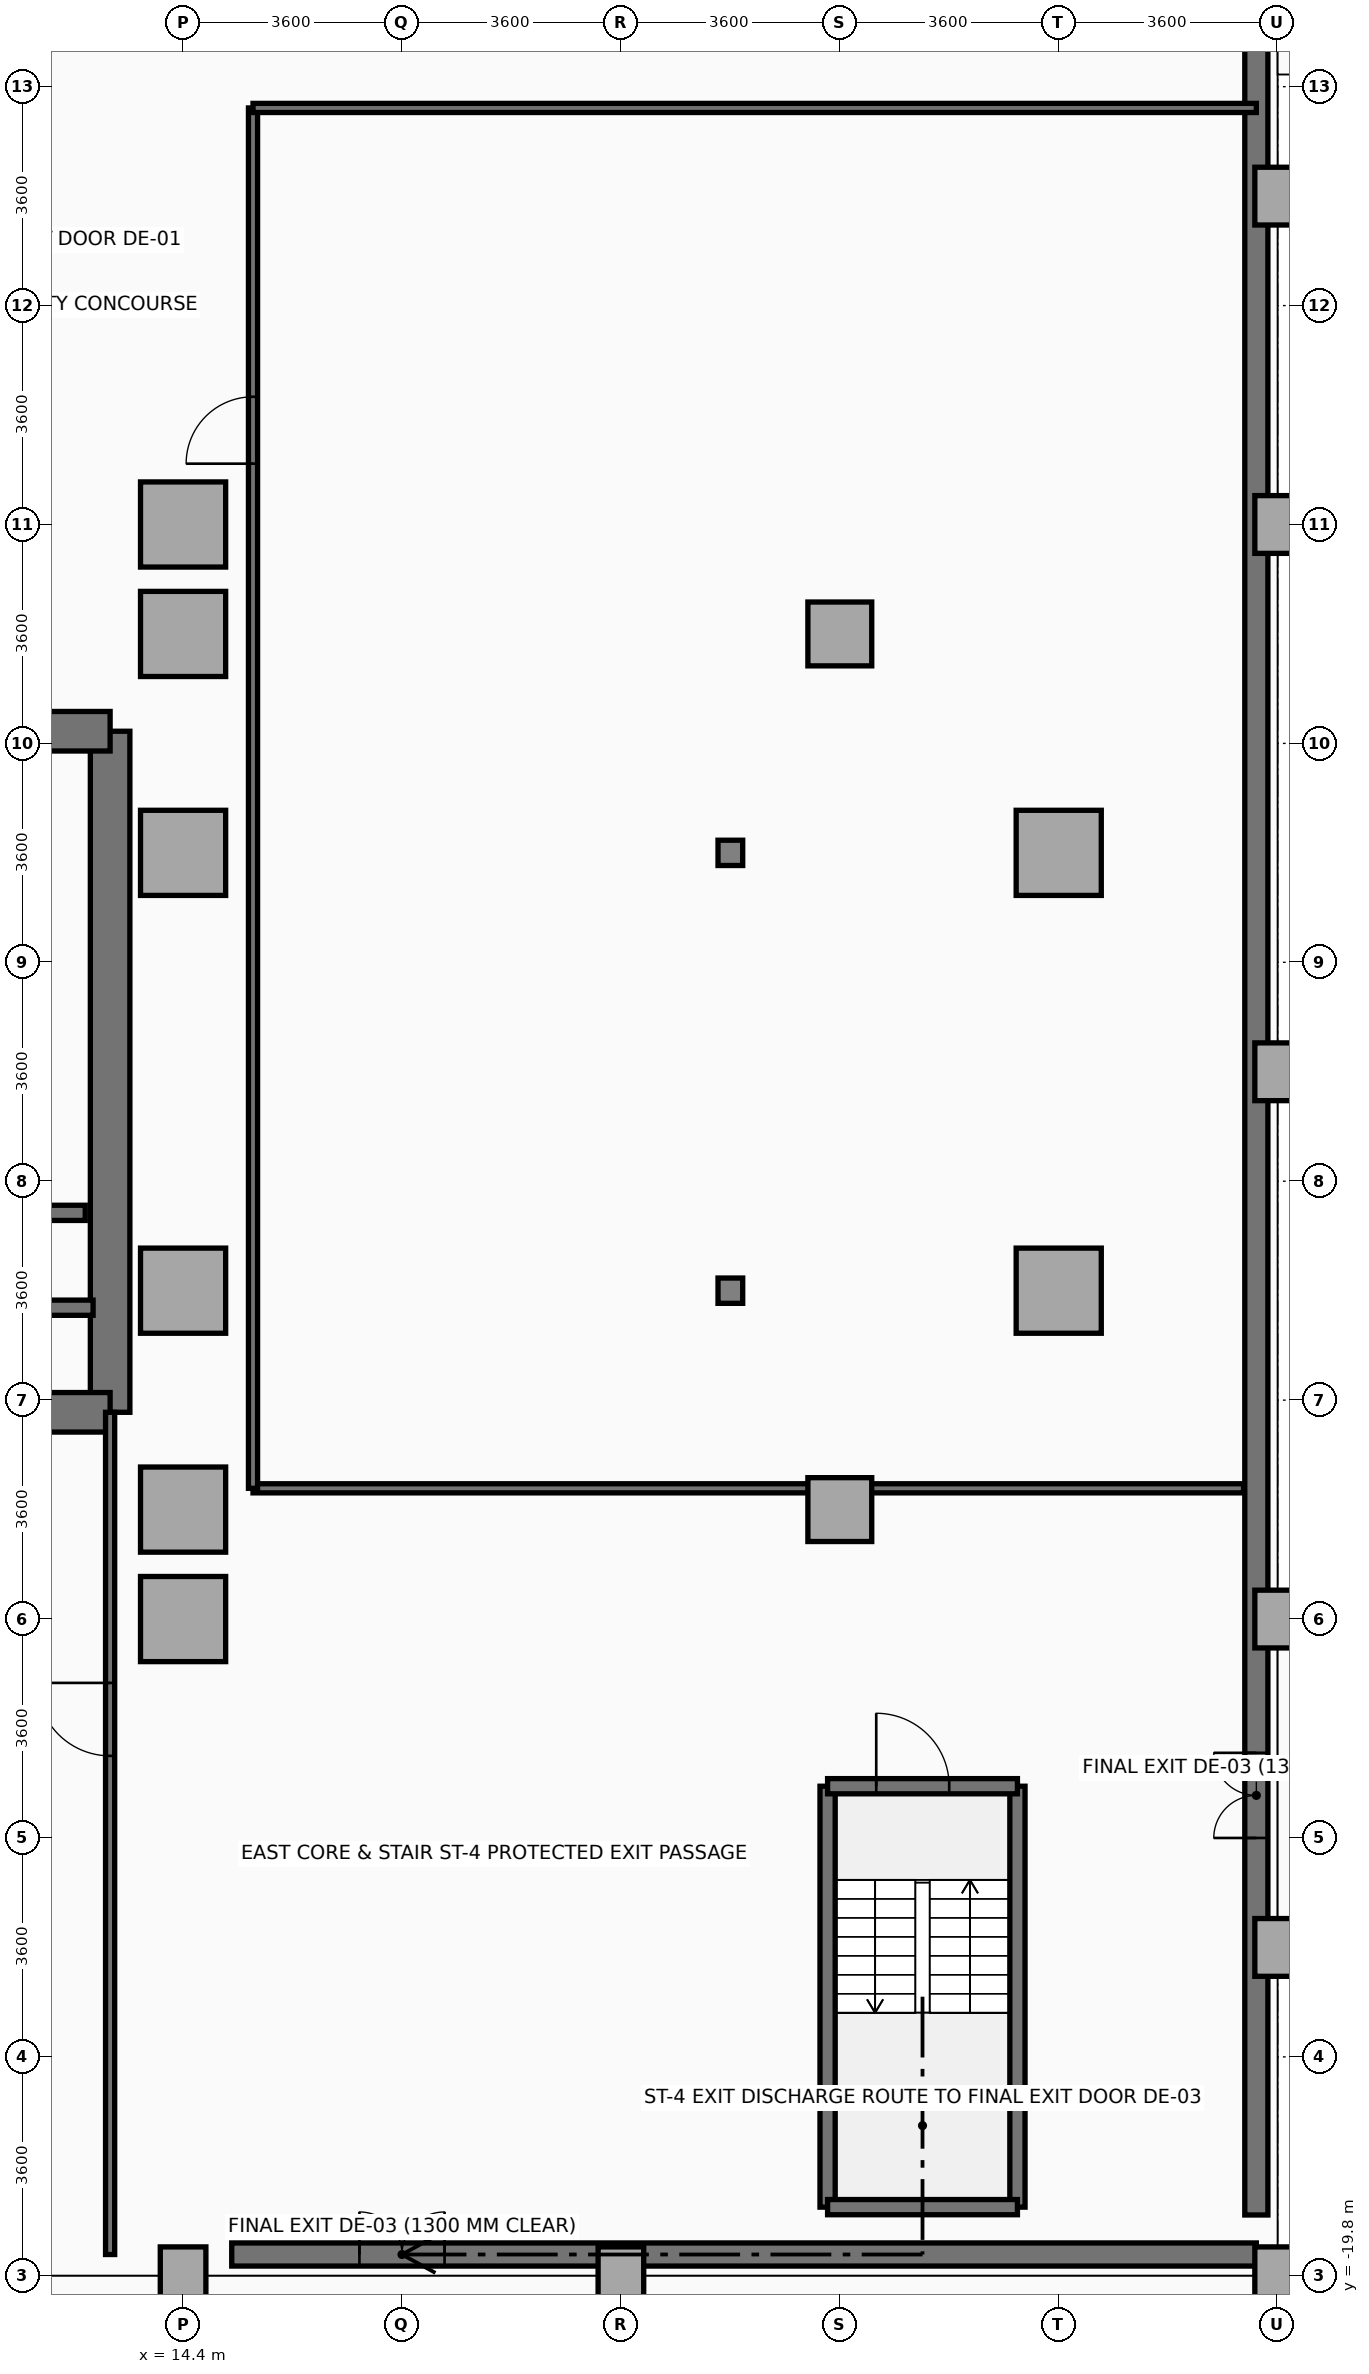
"""IFC4 building model, lengths in metres.
Left out: names, types, materials, properties, quantities, classifications, styles, units other than length and angle.
Written with IfcOpenShell. Run it as: python <this file> out.ifc"""

import sys

from ifc_helpers import new_model, si_unit, direction, frame, frame_2d, origin, origin_2d, place, context, subcontext, project, spatial, rectangle, i_section, extrude, source, transform, mapped, element, fill, save


model = new_model("IFC4")
c1 = context("Model", 3, precision=1e-05, world=origin(), true_north=direction((0.0, 1.0)))
c2 = subcontext(c1, "Body", "Model", "MODEL_VIEW")
j1 = project(units=[si_unit("LENGTHUNIT", "METRE"), si_unit("PLANEANGLEUNIT", "RADIAN")], contexts=[c1])
p1 = place(None, origin())
s1 = spatial("IfcSite", under=j1, at=p1, CompositionType="ELEMENT")
p2 = place(p1, origin())
s2 = spatial("IfcBuilding", under=s1, at=p2, CompositionType="ELEMENT")
p3 = place(p2, origin())
s3 = spatial("IfcBuildingStorey", under=s2, at=p3, CompositionType="ELEMENT", Elevation=0.0)
m1 = source(origin(), c2, "Body", "SweptSolid", [
    extrude(rectangle(XDim=0.75, YDim=0.95, at=origin_2d()), origin(), (0.0, 0.0, 1.0), 5.15),
])
p4 = place(p3, frame((14.4, -19.8, 0.0), z_axis=(0.0, 0.0, 1.0), x_axis=(1.0, 0.0, 0.0)))
e1 = element("IfcColumn", 1, at=p4, inside=s3, PredefinedType="COLUMN", context=c2, shape_type="MappedRepresentation", body=[
    mapped(m1, transform((0.0, 0.0, 0.0), x_axis=(1.0, 0.0, 0.0), y_axis=(0.0, 1.0, 0.0), z_axis=(0.0, 0.0, 1.0), scale=1.0)),
])
m2 = source(origin(), c2, "Body", "SweptSolid", [
    extrude(rectangle(XDim=1.4, YDim=1.4, at=origin_2d()), origin(), (0.0, 0.0, 1.0), 5.15),
])
for number, where, z_axis, x_axis in (
    (2, (14.4, -9.0, 0.0), (0.0, 0.0, 1.0), (1.0, 0.0, 0.0)),
    (3, (14.4, -7.2, 0.0), (0.0, 0.0, 1.0), (1.0, 0.0, 0.0)),
    (4, (14.4, -3.6, 0.0), (0.0, 0.0, 1.0), (1.0, 0.0, 0.0)),
    (5, (14.4, 3.6, 0.0), (0.0, 0.0, 1.0), (1.0, 0.0, 0.0)),
    (6, (14.4, 7.2, 0.0), (0.0, 0.0, 1.0), (1.0, 0.0, 0.0)),
    (7, (14.4, 9.0, 0.0), (0.0, 0.0, 1.0), (1.0, 0.0, 0.0)),
):
    element("IfcColumn", number, at=place(p3, frame(where, z_axis=z_axis, x_axis=x_axis)), inside=s3, PredefinedType="COLUMN", context=c2, shape_type="MappedRepresentation", body=[
        mapped(m2, transform((0.0, 0.0, 0.0), x_axis=(1.0, 0.0, 0.0), y_axis=(0.0, 1.0, 0.0), z_axis=(0.0, 0.0, 1.0), scale=1.0)),
    ])
p5 = place(p3, frame((21.6, -19.8, 0.0), z_axis=(0.0, 0.0, 1.0), x_axis=(1.0, 0.0, 0.0)))
e8 = element("IfcColumn", 8, at=p5, inside=s3, PredefinedType="COLUMN", context=c2, shape_type="MappedRepresentation", body=[
    mapped(m1, transform((0.0, 0.0, 0.0), x_axis=(1.0, 0.0, 0.0), y_axis=(0.0, 1.0, 0.0), z_axis=(0.0, 0.0, 1.0), scale=1.0)),
])
m3 = source(origin(), c2, "Body", "SweptSolid", [
    extrude(i_section(OverallWidth=0.406, OverallDepth=0.416, WebThickness=0.024, FlangeThickness=0.039, at=origin_2d()), origin(), (0.0, 0.0, 1.0), 5.15),
])
for number, where, z_axis, x_axis in (
    (9, (23.4, -3.6, 0.0), (0.0, 0.0, 1.0), (1.0, 0.0, 0.0)),
    (10, (23.4, 3.6, 0.0), (0.0, 0.0, 1.0), (1.0, 0.0, 0.0)),
):
    element("IfcColumn", number, at=place(p3, frame(where, z_axis=z_axis, x_axis=x_axis)), inside=s3, PredefinedType="COLUMN", context=c2, shape_type="MappedRepresentation", body=[
        mapped(m3, transform((0.0, 0.0, 0.0), x_axis=(1.0, 0.0, 0.0), y_axis=(0.0, 1.0, 0.0), z_axis=(0.0, 0.0, 1.0), scale=1.0)),
    ])
m4 = source(origin(), c2, "Body", "SweptSolid", [
    extrude(rectangle(XDim=1.05, YDim=1.05, at=origin_2d()), origin(), (0.0, 0.0, 1.0), 5.15),
])
for number, where, z_axis, x_axis in (
    (11, (25.2, -7.2, 0.0), (0.0, 0.0, 1.0), (1.0, 0.0, 0.0)),
    (12, (25.2, 7.2, 0.0), (0.0, 0.0, 1.0), (1.0, 0.0, 0.0)),
):
    element("IfcColumn", number, at=place(p3, frame(where, z_axis=z_axis, x_axis=x_axis)), inside=s3, PredefinedType="COLUMN", context=c2, shape_type="MappedRepresentation", body=[
        mapped(m4, transform((0.0, 0.0, 0.0), x_axis=(1.0, 0.0, 0.0), y_axis=(0.0, 1.0, 0.0), z_axis=(0.0, 0.0, 1.0), scale=1.0)),
    ])
for number, where, z_axis, x_axis in (
    (13, (28.8, -3.6, 0.0), (0.0, 0.0, 1.0), (1.0, 0.0, 0.0)),
    (14, (28.8, 3.6, 0.0), (0.0, 0.0, 1.0), (1.0, 0.0, 0.0)),
):
    element("IfcColumn", number, at=place(p3, frame(where, z_axis=z_axis, x_axis=x_axis)), inside=s3, PredefinedType="COLUMN", context=c2, shape_type="MappedRepresentation", body=[
        mapped(m2, transform((0.0, 0.0, 0.0), x_axis=(1.0, 0.0, 0.0), y_axis=(0.0, 1.0, 0.0), z_axis=(0.0, 0.0, 1.0), scale=1.0)),
    ])
for number, where, z_axis, x_axis in (
    (15, (32.4, -19.8, 0.0), (0.0, 0.0, 1.0), (1.0, 0.0, 0.0)),
    (16, (32.4, -14.4, 0.0), (0.0, 0.0, 1.0), (1.0, 0.0, 0.0)),
    (17, (32.4, -9.0, 0.0), (0.0, 0.0, 1.0), (1.0, 0.0, 0.0)),
    (18, (32.4, 0.0, 0.0), (0.0, 0.0, 1.0), (1.0, 0.0, 0.0)),
    (19, (32.4, 9.0, 0.0), (0.0, 0.0, 1.0), (1.0, 0.0, 0.0)),
    (20, (32.4, 14.4, 0.0), (0.0, 0.0, 1.0), (1.0, 0.0, 0.0)),
):
    element("IfcColumn", number, at=place(p3, frame(where, z_axis=z_axis, x_axis=x_axis)), inside=s3, PredefinedType="COLUMN", context=c2, shape_type="MappedRepresentation", body=[
        mapped(m1, transform((0.0, 0.0, 0.0), x_axis=(1.0, 0.0, 0.0), y_axis=(0.0, 1.0, 0.0), z_axis=(0.0, 0.0, 1.0), scale=1.0)),
    ])
p6 = place(p3, frame((15.2, -19.45, 0.0), z_axis=(0.0, 0.0, 1.0), x_axis=(1.0, 0.0, 0.0)))
e21 = element("IfcWall", 21, at=p6, inside=s3, PredefinedType="SOLIDWALL", context=c2, shape_type="SweptSolid", body=[
    extrude(rectangle(XDim=16.85, YDim=0.38, at=frame_2d((8.425, 0.0))), origin(), (0.0, 0.0, 1.0), 4.4),
])
p7 = place(p6, frame((2.1, 0.0, 0.0)))
e22 = element("IfcOpeningElement", 22, at=p7, cuts=e21, PredefinedType="OPENING", context=c2, shape_type="SweptSolid", body=[
    extrude(rectangle(XDim=1.4, YDim=2.4, at=frame_2d((0.7, 1.2))), frame((0.0, 0.2, 0.0), z_axis=(0.0, -1.0, 0.0), x_axis=(1.0, 0.0, 0.0)), (0.0, 0.0, 1.0), 0.4),
])
p8 = place(p3, frame((32.05, -18.8, 0.0), z_axis=(0.0, 0.0, 1.0), x_axis=(0.0, 1.0, 0.0)))
e23 = element("IfcWall", 23, at=p8, inside=s3, PredefinedType="SOLIDWALL", context=c2, shape_type="SweptSolid", body=[
    extrude(rectangle(XDim=42.0, YDim=0.38, at=frame_2d((21.0, 0.0))), origin(), (0.0, 0.0, 1.0), 4.4),
])
p9 = place(p8, frame((35.6, 0.0, 0.0)))
e24 = element("IfcOpeningElement", 24, at=p9, cuts=e23, PredefinedType="OPENING", context=c2, shape_type="SweptSolid", body=[
    extrude(rectangle(XDim=6.0, YDim=4.2, at=frame_2d((3.0, 2.1))), frame((0.0, 0.2, 0.0), z_axis=(0.0, -1.0, 0.0), x_axis=(1.0, 0.0, 0.0)), (0.0, 0.0, 1.0), 0.4),
])
p10 = place(p8, frame((6.2, 0.0, 0.0)))
e25 = element("IfcOpeningElement", 25, at=p10, cuts=e23, PredefinedType="OPENING", context=c2, shape_type="SweptSolid", body=[
    extrude(rectangle(XDim=1.4, YDim=2.4, at=frame_2d((0.7, 1.2))), frame((0.0, 0.2, 0.0), z_axis=(0.0, -1.0, 0.0), x_axis=(1.0, 0.0, 0.0)), (0.0, 0.0, 1.0), 0.4),
])
p11 = place(p3, frame((13.2, -5.6, 0.0), z_axis=(0.0, 0.0, 1.0), x_axis=(0.0, 1.0, 0.0)))
e26 = element("IfcWall", 26, at=p11, inside=s3, PredefinedType="SHEAR", context=c2, shape_type="SweptSolid", body=[
    extrude(rectangle(XDim=11.2, YDim=0.65, at=frame_2d((5.6, 0.0))), origin(), (0.0, 0.0, 1.0), 5.15),
])
p12 = place(p3, frame((11.381, 5.6, 0.0), z_axis=(0.0, 0.0, 1.0), x_axis=(1.0, 0.0, 0.0)))
e27 = element("IfcWall", 27, at=p12, inside=s3, PredefinedType="SHEAR", context=c2, shape_type="SweptSolid", body=[
    extrude(rectangle(XDim=1.819, YDim=0.65, at=frame_2d((0.909, 0.0))), origin(), (0.0, 0.0, 1.0), 5.15),
])
p13 = place(p3, frame((5.4, -5.6, 0.0), z_axis=(0.0, 0.0, 1.0), x_axis=(1.0, 0.0, 0.0)))
e28 = element("IfcWall", 28, at=p13, inside=s3, PredefinedType="SHEAR", context=c2, shape_type="SweptSolid", body=[
    extrude(rectangle(XDim=7.8, YDim=0.65, at=frame_2d((3.9, 0.0))), origin(), (0.0, 0.0, 1.0), 5.15),
])
p14 = place(p13, frame((3.0, 0.0, 0.0)))
e29 = element("IfcOpeningElement", 29, at=p14, cuts=e28, PredefinedType="OPENING", context=c2, shape_type="SweptSolid", body=[
    extrude(rectangle(XDim=1.2, YDim=2.2, at=frame_2d((0.6, 1.1))), frame((0.0, 0.335, 0.0), z_axis=(0.0, -1.0, 0.0), x_axis=(1.0, 0.0, 0.0)), (0.0, 0.0, 1.0), 0.67),
])
for number, where, z_axis, x_axis in (
    (30, (24.999, -18.671, 0.0), (0.0, 0.0, 1.0), (0.0, 1.0, 0.0)),
    (31, (28.121, -18.671, 0.0), (0.0, 0.0, 1.0), (0.0, 1.0, 0.0)),
):
    element("IfcWall", number, at=place(p3, frame(where, z_axis=z_axis, x_axis=x_axis)), inside=s3, PredefinedType="SOLIDWALL", context=c2, shape_type="SweptSolid", body=[
        extrude(rectangle(XDim=6.922, YDim=0.25, at=frame_2d((3.461, 0.0))), origin(), (0.0, 0.0, 1.0), 5.15),
    ])
p15 = place(p3, frame((24.999, -18.671, 0.0), z_axis=(0.0, 0.0, 1.0), x_axis=(1.0, 0.0, 0.0)))
e32 = element("IfcWall", 32, at=p15, inside=s3, PredefinedType="SOLIDWALL", context=c2, shape_type="SweptSolid", body=[
    extrude(rectangle(XDim=3.122, YDim=0.25, at=frame_2d((1.561, 0.0))), origin(), (0.0, 0.0, 1.0), 5.15),
])
p16 = place(p3, frame((24.999, -11.749, 0.0), z_axis=(0.0, 0.0, 1.0), x_axis=(1.0, 0.0, 0.0)))
e33 = element("IfcWall", 33, at=p16, inside=s3, PredefinedType="SOLIDWALL", context=c2, shape_type="SweptSolid", body=[
    extrude(rectangle(XDim=3.122, YDim=0.25, at=frame_2d((1.561, 0.0))), origin(), (0.0, 0.0, 1.0), 5.15),
])
p17 = place(p16, frame((0.8, 0.0, 0.0)))
e34 = element("IfcOpeningElement", 34, at=p17, cuts=e33, PredefinedType="OPENING", context=c2, shape_type="SweptSolid", body=[
    extrude(rectangle(XDim=1.2, YDim=2.2, at=frame_2d((0.6, 1.1))), frame((0.0, 0.135, 0.0), z_axis=(0.0, -1.0, 0.0), x_axis=(1.0, 0.0, 0.0)), (0.0, 0.0, 1.0), 0.27),
])
p18 = place(p3, frame((11.08, -3.88, 0.0), z_axis=(0.0, 0.0, 1.0), x_axis=(1.0, 0.0, 0.0)))
e35 = element("IfcWall", 35, at=p18, inside=s3, PredefinedType="SOLIDWALL", context=c2, shape_type="SweptSolid", body=[
    extrude(rectangle(XDim=1.84, YDim=0.25, at=frame_2d((0.92, 0.0))), origin(), (0.0, 0.0, 1.0), 5.15),
])
p19 = place(p3, frame((11.209, -2.32, 0.0), z_axis=(0.0, 0.0, 1.0), x_axis=(1.0, 0.0, 0.0)))
e36 = element("IfcWall", 36, at=p19, inside=s3, PredefinedType="SOLIDWALL", context=c2, shape_type="SweptSolid", body=[
    extrude(rectangle(XDim=1.582, YDim=0.25, at=frame_2d((0.791, 0.0))), origin(), (0.0, 0.0, 1.0), 5.15),
])
p20 = place(p3, frame((13.2, -19.45, 0.0), z_axis=(0.0, 0.0, 1.0), x_axis=(0.0, 1.0, 0.0)))
e37 = element("IfcWall", 37, at=p20, inside=s3, PredefinedType="PARTITIONING", context=c2, shape_type="SweptSolid", body=[
    extrude(rectangle(XDim=13.85, YDim=0.15, at=frame_2d((6.925, 0.0))), origin(), (0.0, 0.0, 1.0), 3.8),
])
p21 = place(p20, frame((8.2, 0.0, 0.0)))
e38 = element("IfcOpeningElement", 38, at=p21, cuts=e37, PredefinedType="OPENING", context=c2, shape_type="SweptSolid", body=[
    extrude(rectangle(XDim=1.2, YDim=2.2, at=frame_2d((0.6, 1.1))), frame((0.0, 0.085, 0.0), z_axis=(0.0, -1.0, 0.0), x_axis=(1.0, 0.0, 0.0)), (0.0, 0.0, 1.0), 0.17),
])
p22 = place(p3, frame((15.55, -6.85, 0.0), z_axis=(0.0, 0.0, 1.0), x_axis=(1.0, 0.0, 0.0)))
e39 = element("IfcWall", 39, at=p22, inside=s3, PredefinedType="PARTITIONING", context=c2, shape_type="SweptSolid", body=[
    extrude(rectangle(XDim=16.29, YDim=0.15, at=frame_2d((8.145, 0.0))), origin(), (0.0, 0.0, 1.0), 3.8),
])
p23 = place(p3, frame((15.55, -6.85, 0.0), z_axis=(0.0, 0.0, 1.0), x_axis=(0.0, 1.0, 0.0)))
e40 = element("IfcWall", 40, at=p23, inside=s3, PredefinedType="PARTITIONING", context=c2, shape_type="SweptSolid", body=[
    extrude(rectangle(XDim=22.7, YDim=0.15, at=frame_2d((11.35, 0.0))), origin(), (0.0, 0.0, 1.0), 3.8),
])
p24 = place(p23, frame((16.85, 0.0, 0.0)))
e41 = element("IfcOpeningElement", 41, at=p24, cuts=e40, PredefinedType="OPENING", context=c2, shape_type="SweptSolid", body=[
    extrude(rectangle(XDim=1.1, YDim=2.2, at=frame_2d((0.55, 1.1))), frame((0.0, 0.085, 0.0), z_axis=(0.0, -1.0, 0.0), x_axis=(1.0, 0.0, 0.0)), (0.0, 0.0, 1.0), 0.17),
])
p25 = place(p3, frame((15.55, 15.85, 0.0), z_axis=(0.0, 0.0, 1.0), x_axis=(1.0, 0.0, 0.0)))
e42 = element("IfcWall", 42, at=p25, inside=s3, PredefinedType="PARTITIONING", context=c2, shape_type="SweptSolid", body=[
    extrude(rectangle(XDim=16.5, YDim=0.15, at=frame_2d((8.25, 0.0))), origin(), (0.0, 0.0, 1.0), 5.15),
])
m5 = source(origin(), c2, "Body", "SweptSolid", [
    extrude(rectangle(XDim=1.4, YDim=2.4, at=frame_2d((0.7, 1.2))), frame((0.0, 0.025, 0.0), z_axis=(0.0, -1.0, 0.0), x_axis=(1.0, 0.0, 0.0)), (0.0, 0.0, 1.0), 0.05),
])
p26 = place(p7, frame((1.4, 0.0, 0.0), z_axis=(0.0, 0.0, 1.0), x_axis=(-1.0, 0.0, 0.0)))
e43 = element("IfcDoor", 43, at=p26, inside=s3, OperationType="DOUBLE_DOOR_SINGLE_SWING", PredefinedType="DOOR", context=c2, shape_type="MappedRepresentation", body=[
    mapped(m5, transform((0.0, 0.0, 0.0), x_axis=(1.0, 0.0, 0.0), y_axis=(0.0, 1.0, 0.0), z_axis=(0.0, 0.0, 1.0), scale=1.0)),
])
fill(e22, e43)
p27 = place(p10, frame((1.4, 0.0, 0.0), z_axis=(0.0, 0.0, 1.0), x_axis=(-1.0, 0.0, 0.0)))
e44 = element("IfcDoor", 44, at=p27, inside=s3, OperationType="DOUBLE_DOOR_SINGLE_SWING", PredefinedType="DOOR", context=c2, shape_type="MappedRepresentation", body=[
    mapped(m5, transform((0.0, 0.0, 0.0), x_axis=(1.0, 0.0, 0.0), y_axis=(0.0, 1.0, 0.0), z_axis=(0.0, 0.0, 1.0), scale=1.0)),
])
fill(e25, e44)
m6 = source(origin(), c2, "Body", "SweptSolid", [
    extrude(rectangle(XDim=1.2, YDim=2.2, at=frame_2d((0.6, 1.1))), frame((0.0, 0.025, 0.0), z_axis=(0.0, -1.0, 0.0), x_axis=(1.0, 0.0, 0.0)), (0.0, 0.0, 1.0), 0.05),
])
p28 = place(p17, origin())
e45 = element("IfcDoor", 45, at=p28, inside=s3, OperationType="SINGLE_SWING_LEFT", PredefinedType="DOOR", context=c2, shape_type="MappedRepresentation", body=[
    mapped(m6, transform((0.0, 0.0, 0.0), x_axis=(1.0, 0.0, 0.0), y_axis=(0.0, 1.0, 0.0), z_axis=(0.0, 0.0, 1.0), scale=1.0)),
])
fill(e34, e45)
p29 = place(p21, origin())
e46 = element("IfcDoor", 46, at=p29, inside=s3, OperationType="SINGLE_SWING_RIGHT", PredefinedType="DOOR", context=c2, shape_type="MappedRepresentation", body=[
    mapped(m6, transform((0.0, 0.0, 0.0), x_axis=(1.0, 0.0, 0.0), y_axis=(0.0, 1.0, 0.0), z_axis=(0.0, 0.0, 1.0), scale=1.0)),
])
fill(e38, e46)
m7 = source(origin(), c2, "Body", "SweptSolid", [
    extrude(rectangle(XDim=1.1, YDim=2.2, at=frame_2d((0.55, 1.1))), frame((0.0, 0.025, 0.0), z_axis=(0.0, -1.0, 0.0), x_axis=(1.0, 0.0, 0.0)), (0.0, 0.0, 1.0), 0.05),
])
p30 = place(p24, origin())
e47 = element("IfcDoor", 47, at=p30, inside=s3, OperationType="SINGLE_SWING_LEFT", PredefinedType="DOOR", context=c2, shape_type="MappedRepresentation", body=[
    mapped(m7, transform((0.0, 0.0, 0.0), x_axis=(1.0, 0.0, 0.0), y_axis=(0.0, 1.0, 0.0), z_axis=(0.0, 0.0, 1.0), scale=1.0)),
])
fill(e41, e47)
save(model, sys.argv[1])
